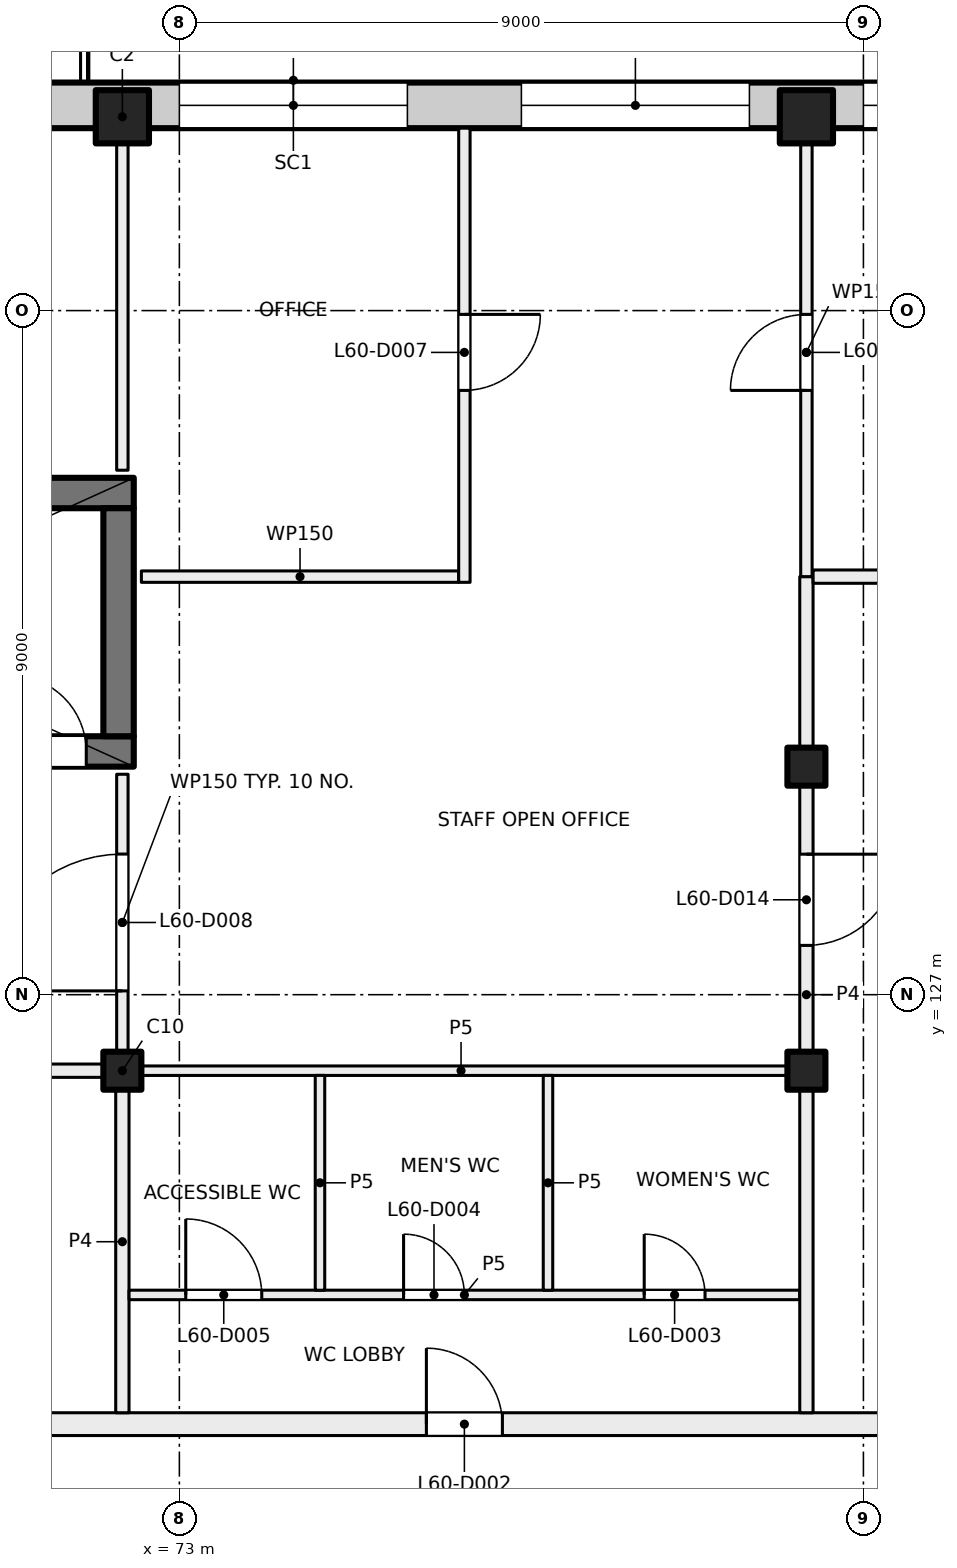
"""IFC4 building model, lengths in metres.
Left out: names, types, materials, properties, quantities, classifications, styles, units other than length and angle.
Written with IfcOpenShell. Run it as: python <this file> out.ifc"""

import sys

from ifc_helpers import new_model, si_unit, direction, frame, frame_2d, origin, origin_2d, place, context, subcontext, project, spatial, rectangle, extrude, element, fill, save


model = new_model("IFC4")
c1 = context("Model", 3, precision=1e-05, world=origin(), true_north=direction((0.0, 1.0)))
c2 = subcontext(c1, "Body", "Model", "MODEL_VIEW")
j1 = project(units=[si_unit("LENGTHUNIT", "METRE"), si_unit("PLANEANGLEUNIT", "RADIAN")], contexts=[c1])
p1 = place(None, origin())
s1 = spatial("IfcSite", under=j1, at=p1, CompositionType="ELEMENT")
p2 = place(p1, origin())
s2 = spatial("IfcBuilding", under=s1, at=p2, CompositionType="ELEMENT")
p3 = place(p2, frame((0.0, 0.0, 253.5)))
s3 = spatial("IfcBuildingStorey", under=s2, at=p3, CompositionType="ELEMENT", Elevation=253.5)
for number, where, z_axis, x_axis in (
    (1, (81.25, 130.0, 0.0), (0.0, 0.0, 1.0), (1.0, 0.0, 0.0)),
    (2, (72.25, 126.0, 0.0), (0.0, 0.0, 1.0), (1.0, 0.0, 0.0)),
    (3, (81.25, 126.0, 0.0), (0.0, 0.0, 1.0), (1.0, 0.0, 0.0)),
):
    element("IfcColumn", number, at=place(p3, frame(where, z_axis=z_axis, x_axis=x_axis)), inside=s3, PredefinedType="COLUMN", context=c2, shape_type="SweptSolid", body=[
        extrude(rectangle(XDim=0.5, YDim=0.5, at=origin_2d()), origin(), (0.0, 0.0, 1.0), 4.0),
    ])
for number, where, z_axis, x_axis in (
    (4, (72.25, 138.55, 0.0), (0.0, 0.0, 1.0), (1.0, 0.0, 0.0)),
    (5, (81.25, 138.55, 0.0), (0.0, 0.0, 1.0), (1.0, 0.0, 0.0)),
):
    element("IfcColumn", number, at=place(p3, frame(where, z_axis=z_axis, x_axis=x_axis)), inside=s3, PredefinedType="COLUMN", context=c2, shape_type="SweptSolid", body=[
        extrude(rectangle(XDim=0.7, YDim=0.7, at=origin_2d()), origin(), (0.0, 0.0, 1.0), 4.0),
    ])
p4 = place(p3, frame((63.5, 130.2, 0.0), z_axis=(0.0, 0.0, 1.0), x_axis=(1.0, 0.0, 0.0)))
e6 = element("IfcWall", 6, at=p4, inside=s3, PredefinedType="SHEAR", context=c2, shape_type="SweptSolid", body=[
    extrude(rectangle(XDim=8.9, YDim=0.4, at=frame_2d((4.45, 0.0))), origin(), (0.0, 0.0, 1.0), 4.0),
])
p5 = place(p4, frame((7.275, 0.0, 0.0)))
e7 = element("IfcOpeningElement", 7, at=p5, cuts=e6, PredefinedType="OPENING", context=c2, shape_type="SweptSolid", body=[
    extrude(rectangle(XDim=1.0, YDim=2.1, at=frame_2d((0.5, 1.05))), frame((0.0, 0.21, 0.0), z_axis=(0.0, -1.0, 0.0), x_axis=(1.0, 0.0, 0.0)), (0.0, 0.0, 1.0), 0.42),
])
p6 = place(p3, frame((64.0, 133.6, 0.0), z_axis=(0.0, 0.0, 1.0), x_axis=(1.0, 0.0, 0.0)))
e8 = element("IfcWall", 8, at=p6, inside=s3, PredefinedType="SHEAR", context=c2, shape_type="SweptSolid", body=[
    extrude(rectangle(XDim=8.4, YDim=0.4, at=frame_2d((4.2, 0.0))), origin(), (0.0, 0.0, 1.0), 4.0),
])
p7 = place(p3, frame((72.2, 130.4, 0.0), z_axis=(0.0, 0.0, 1.0), x_axis=(0.0, 1.0, 0.0)))
e9 = element("IfcWall", 9, at=p7, inside=s3, PredefinedType="SHEAR", context=c2, shape_type="SweptSolid", body=[
    extrude(rectangle(XDim=3.0, YDim=0.4, at=frame_2d((1.5, 0.0))), origin(), (0.0, 0.0, 1.0), 4.0),
])
p8 = place(p3, frame((47.07, 138.7, 0.0), z_axis=(0.0, 0.0, 1.0), x_axis=(1.0, 0.0, 0.0)))
e10 = element("IfcWall", 10, at=p8, inside=s3, PredefinedType="SOLIDWALL", context=c2, shape_type="SweptSolid", body=[
    extrude(rectangle(XDim=43.91, YDim=0.6, at=frame_2d((21.955, 0.0))), origin(), (0.0, 0.0, 1.0), 3.625),
])
p9 = place(p8, frame((3.43, 0.0, 0.9)))
e11 = element("IfcOpeningElement", 11, at=p9, cuts=e10, PredefinedType="OPENING", context=c2, shape_type="SweptSolid", body=[
    extrude(rectangle(XDim=3.0, YDim=2.4, at=frame_2d((1.5, 1.2))), frame((0.0, 0.31, 0.0), z_axis=(0.0, -1.0, 0.0), x_axis=(1.0, 0.0, 0.0)), (0.0, 0.0, 1.0), 0.62),
])
p10 = place(p8, frame((8.53, 0.0, 0.0)))
e12 = element("IfcOpeningElement", 12, at=p10, cuts=e10, PredefinedType="OPENING", context=c2, shape_type="SweptSolid", body=[
    extrude(rectangle(XDim=1.8, YDim=2.4, at=frame_2d((0.9, 1.2))), frame((0.0, 0.31, 0.0), z_axis=(0.0, -1.0, 0.0), x_axis=(1.0, 0.0, 0.0)), (0.0, 0.0, 1.0), 0.62),
])
p11 = place(p8, frame((12.43, 0.0, 0.9)))
e13 = element("IfcOpeningElement", 13, at=p11, cuts=e10, PredefinedType="OPENING", context=c2, shape_type="SweptSolid", body=[
    extrude(rectangle(XDim=3.0, YDim=2.4, at=frame_2d((1.5, 1.2))), frame((0.0, 0.31, 0.0), z_axis=(0.0, -1.0, 0.0), x_axis=(1.0, 0.0, 0.0)), (0.0, 0.0, 1.0), 0.62),
])
p12 = place(p8, frame((16.93, 0.0, 0.9)))
e14 = element("IfcOpeningElement", 14, at=p12, cuts=e10, PredefinedType="OPENING", context=c2, shape_type="SweptSolid", body=[
    extrude(rectangle(XDim=3.0, YDim=2.4, at=frame_2d((1.5, 1.2))), frame((0.0, 0.31, 0.0), z_axis=(0.0, -1.0, 0.0), x_axis=(1.0, 0.0, 0.0)), (0.0, 0.0, 1.0), 0.62),
])
p13 = place(p8, frame((22.03, 0.0, 0.0)))
e15 = element("IfcOpeningElement", 15, at=p13, cuts=e10, PredefinedType="OPENING", context=c2, shape_type="SweptSolid", body=[
    extrude(rectangle(XDim=1.8, YDim=2.4, at=frame_2d((0.9, 1.2))), frame((0.0, 0.31, 0.0), z_axis=(0.0, -1.0, 0.0), x_axis=(1.0, 0.0, 0.0)), (0.0, 0.0, 1.0), 0.62),
])
p14 = place(p8, frame((25.93, 0.0, 0.9)))
e16 = element("IfcOpeningElement", 16, at=p14, cuts=e10, PredefinedType="OPENING", context=c2, shape_type="SweptSolid", body=[
    extrude(rectangle(XDim=3.0, YDim=2.4, at=frame_2d((1.5, 1.2))), frame((0.0, 0.31, 0.0), z_axis=(0.0, -1.0, 0.0), x_axis=(1.0, 0.0, 0.0)), (0.0, 0.0, 1.0), 0.62),
])
p15 = place(p8, frame((30.43, 0.0, 0.9)))
e17 = element("IfcOpeningElement", 17, at=p15, cuts=e10, PredefinedType="OPENING", context=c2, shape_type="SweptSolid", body=[
    extrude(rectangle(XDim=3.0, YDim=2.4, at=frame_2d((1.5, 1.2))), frame((0.0, 0.31, 0.0), z_axis=(0.0, -1.0, 0.0), x_axis=(1.0, 0.0, 0.0)), (0.0, 0.0, 1.0), 0.62),
])
p16 = place(p8, frame((34.93, 0.0, 0.9)))
e18 = element("IfcOpeningElement", 18, at=p16, cuts=e10, PredefinedType="OPENING", context=c2, shape_type="SweptSolid", body=[
    extrude(rectangle(XDim=3.0, YDim=2.4, at=frame_2d((1.5, 1.2))), frame((0.0, 0.31, 0.0), z_axis=(0.0, -1.0, 0.0), x_axis=(1.0, 0.0, 0.0)), (0.0, 0.0, 1.0), 0.62),
])
p17 = place(p8, frame((39.43, 0.0, 0.9)))
e19 = element("IfcOpeningElement", 19, at=p17, cuts=e10, PredefinedType="OPENING", context=c2, shape_type="SweptSolid", body=[
    extrude(rectangle(XDim=3.0, YDim=2.4, at=frame_2d((1.5, 1.2))), frame((0.0, 0.31, 0.0), z_axis=(0.0, -1.0, 0.0), x_axis=(1.0, 0.0, 0.0)), (0.0, 0.0, 1.0), 0.62),
])
p18 = place(p3, frame((54.4, 121.35, 0.0), z_axis=(0.0, 0.0, 1.0), x_axis=(1.0, 0.0, 0.0)))
e20 = element("IfcWall", 20, at=p18, inside=s3, PredefinedType="PARTITIONING", context=c2, shape_type="SweptSolid", body=[
    extrude(rectangle(XDim=31.353, YDim=0.3, at=frame_2d((15.677, 0.0))), origin(), (0.0, 0.0, 1.0), 3.625),
])
p19 = place(p18, frame((21.85, 0.0, 0.0)))
e21 = element("IfcOpeningElement", 21, at=p19, cuts=e20, PredefinedType="OPENING", context=c2, shape_type="SweptSolid", body=[
    extrude(rectangle(XDim=1.0, YDim=2.1, at=frame_2d((0.5, 1.05))), frame((0.0, 0.16, 0.0), z_axis=(0.0, -1.0, 0.0), x_axis=(1.0, 0.0, 0.0)), (0.0, 0.0, 1.0), 0.32),
])
p20 = place(p18, frame((12.75, 0.0, 0.0)))
e22 = element("IfcOpeningElement", 22, at=p20, cuts=e20, PredefinedType="OPENING", context=c2, shape_type="SweptSolid", body=[
    extrude(rectangle(XDim=1.2, YDim=2.1, at=frame_2d((0.6, 1.05))), frame((0.0, 0.16, 0.0), z_axis=(0.0, -1.0, 0.0), x_axis=(1.0, 0.0, 0.0)), (0.0, 0.0, 1.0), 0.32),
])
p21 = place(p18, frame((3.515, 0.0, 0.0)))
e23 = element("IfcOpeningElement", 23, at=p21, cuts=e20, PredefinedType="OPENING", context=c2, shape_type="SweptSolid", body=[
    extrude(rectangle(XDim=1.8, YDim=2.1, at=frame_2d((0.9, 1.05))), frame((0.0, 0.16, 0.0), z_axis=(0.0, -1.0, 0.0), x_axis=(1.0, 0.0, 0.0)), (0.0, 0.0, 1.0), 0.32),
])
p22 = place(p3, frame((72.25, 121.5, 0.0), z_axis=(0.0, 0.0, 1.0), x_axis=(0.0, 1.0, 0.0)))
e24 = element("IfcWall", 24, at=p22, inside=s3, PredefinedType="PARTITIONING", context=c2, shape_type="SweptSolid", body=[
    extrude(rectangle(XDim=4.5, YDim=0.175, at=frame_2d((2.25, 0.0))), origin(), (0.0, 0.0, 1.0), 3.625),
])
p23 = place(p3, frame((72.338, 123.05, 0.0), z_axis=(0.0, 0.0, 1.0), x_axis=(1.0, 0.0, 0.0)))
e25 = element("IfcWall", 25, at=p23, inside=s3, PredefinedType="PARTITIONING", context=c2, shape_type="SweptSolid", body=[
    extrude(rectangle(XDim=8.824, YDim=0.125, at=frame_2d((4.412, 0.0))), origin(), (0.0, 0.0, 1.0), 3.625),
])
p24 = place(p23, frame((6.778, 0.0, 0.0)))
e26 = element("IfcOpeningElement", 26, at=p24, cuts=e25, PredefinedType="OPENING", context=c2, shape_type="SweptSolid", body=[
    extrude(rectangle(XDim=0.8, YDim=2.1, at=frame_2d((0.4, 1.05))), frame((0.0, 0.073, 0.0), z_axis=(0.0, -1.0, 0.0), x_axis=(1.0, 0.0, 0.0)), (0.0, 0.0, 1.0), 0.145),
])
p25 = place(p23, frame((3.612, 0.0, 0.0)))
e27 = element("IfcOpeningElement", 27, at=p25, cuts=e25, PredefinedType="OPENING", context=c2, shape_type="SweptSolid", body=[
    extrude(rectangle(XDim=0.8, YDim=2.1, at=frame_2d((0.4, 1.05))), frame((0.0, 0.073, 0.0), z_axis=(0.0, -1.0, 0.0), x_axis=(1.0, 0.0, 0.0)), (0.0, 0.0, 1.0), 0.145),
])
p26 = place(p23, frame((0.746, 0.0, 0.0)))
e28 = element("IfcOpeningElement", 28, at=p26, cuts=e25, PredefinedType="OPENING", context=c2, shape_type="SweptSolid", body=[
    extrude(rectangle(XDim=1.0, YDim=2.1, at=frame_2d((0.5, 1.05))), frame((0.0, 0.073, 0.0), z_axis=(0.0, -1.0, 0.0), x_axis=(1.0, 0.0, 0.0)), (0.0, 0.0, 1.0), 0.145),
])
p27 = place(p3, frame((72.25, 126.0, 0.0), z_axis=(0.0, 0.0, 1.0), x_axis=(-1.0, 0.0, 0.0)))
e29 = element("IfcWall", 29, at=p27, inside=s3, PredefinedType="PARTITIONING", context=c2, shape_type="SweptSolid", body=[
    extrude(rectangle(XDim=9.088, YDim=0.175, at=frame_2d((4.544, 0.0))), origin(), (0.0, 0.0, 1.0), 3.625),
])
p28 = place(p3, frame((72.25, 126.0, 0.0), z_axis=(0.0, 0.0, 1.0), x_axis=(0.0, 1.0, 0.0)))
e30 = element("IfcWall", 30, at=p28, inside=s3, PredefinedType="PARTITIONING", context=c2, shape_type="SweptSolid", body=[
    extrude(rectangle(XDim=3.9, YDim=0.15, at=frame_2d((1.95, 0.0))), origin(), (0.0, 0.0, 1.0), 3.625),
])
p29 = place(p28, frame((1.05, 0.0, 0.0)))
e31 = element("IfcOpeningElement", 31, at=p29, cuts=e30, PredefinedType="OPENING", context=c2, shape_type="SweptSolid", body=[
    extrude(rectangle(XDim=1.8, YDim=2.1, at=frame_2d((0.9, 1.05))), frame((0.0, 0.085, 0.0), z_axis=(0.0, -1.0, 0.0), x_axis=(1.0, 0.0, 0.0)), (0.0, 0.0, 1.0), 0.17),
])
p30 = place(p3, frame((72.25, 126.0, 0.0), z_axis=(0.0, 0.0, 1.0), x_axis=(1.0, 0.0, 0.0)))
e32 = element("IfcWall", 32, at=p30, inside=s3, PredefinedType="PARTITIONING", context=c2, shape_type="SweptSolid", body=[
    extrude(rectangle(XDim=8.912, YDim=0.125, at=frame_2d((4.456, 0.0))), origin(), (0.0, 0.0, 1.0), 3.625),
])
p31 = place(p3, frame((72.25, 133.9, 0.0), z_axis=(0.0, 0.0, 1.0), x_axis=(0.0, 1.0, 0.0)))
e33 = element("IfcWall", 33, at=p31, inside=s3, PredefinedType="PARTITIONING", context=c2, shape_type="SweptSolid", body=[
    extrude(rectangle(XDim=4.5, YDim=0.15, at=frame_2d((2.25, 0.0))), origin(), (0.0, 0.0, 1.0), 3.625),
])
p32 = place(p3, frame((74.85, 125.938, 0.0), z_axis=(0.0, 0.0, 1.0), x_axis=(0.0, -1.0, 0.0)))
e34 = element("IfcWall", 34, at=p32, inside=s3, PredefinedType="PARTITIONING", context=c2, shape_type="SweptSolid", body=[
    extrude(rectangle(XDim=2.826, YDim=0.125, at=frame_2d((1.413, 0.0))), origin(), (0.0, 0.0, 1.0), 3.625),
])
p33 = place(p3, frame((76.675, 132.5, 0.0), z_axis=(0.0, 0.0, 1.0), x_axis=(-1.0, 0.0, 0.0)))
e35 = element("IfcWall", 35, at=p33, inside=s3, PredefinedType="PARTITIONING", context=c2, shape_type="SweptSolid", body=[
    extrude(rectangle(XDim=4.175, YDim=0.15, at=frame_2d((2.087, 0.0))), origin(), (0.0, 0.0, 1.0), 3.625),
])
p34 = place(p3, frame((76.75, 138.4, 0.0), z_axis=(0.0, 0.0, 1.0), x_axis=(0.0, -1.0, 0.0)))
e36 = element("IfcWall", 36, at=p34, inside=s3, PredefinedType="PARTITIONING", context=c2, shape_type="SweptSolid", body=[
    extrude(rectangle(XDim=5.975, YDim=0.15, at=frame_2d((2.987, 0.0))), origin(), (0.0, 0.0, 1.0), 3.625),
])
p35 = place(p34, frame((2.45, 0.0, 0.0)))
e37 = element("IfcOpeningElement", 37, at=p35, cuts=e36, PredefinedType="OPENING", context=c2, shape_type="SweptSolid", body=[
    extrude(rectangle(XDim=1.0, YDim=2.1, at=frame_2d((0.5, 1.05))), frame((0.0, 0.085, 0.0), z_axis=(0.0, -1.0, 0.0), x_axis=(1.0, 0.0, 0.0)), (0.0, 0.0, 1.0), 0.17),
])
p36 = place(p3, frame((77.85, 125.938, 0.0), z_axis=(0.0, 0.0, 1.0), x_axis=(0.0, -1.0, 0.0)))
e38 = element("IfcWall", 38, at=p36, inside=s3, PredefinedType="PARTITIONING", context=c2, shape_type="SweptSolid", body=[
    extrude(rectangle(XDim=2.826, YDim=0.125, at=frame_2d((1.413, 0.0))), origin(), (0.0, 0.0, 1.0), 3.625),
])
p37 = place(p3, frame((81.25, 132.5, 0.0), z_axis=(0.0, 0.0, 1.0), x_axis=(0.0, -1.0, 0.0)))
e39 = element("IfcWall", 39, at=p37, inside=s3, PredefinedType="PARTITIONING", context=c2, shape_type="SweptSolid", body=[
    extrude(rectangle(XDim=11.0, YDim=0.175, at=frame_2d((5.5, 0.0))), origin(), (0.0, 0.0, 1.0), 3.625),
])
p38 = place(p37, frame((3.652, 0.0, 0.0)))
e40 = element("IfcOpeningElement", 40, at=p38, cuts=e39, PredefinedType="OPENING", context=c2, shape_type="SweptSolid", body=[
    extrude(rectangle(XDim=1.2, YDim=2.1, at=frame_2d((0.6, 1.05))), frame((0.0, 0.097, 0.0), z_axis=(0.0, -1.0, 0.0), x_axis=(1.0, 0.0, 0.0)), (0.0, 0.0, 1.0), 0.195),
])
p39 = place(p3, frame((81.25, 132.5, 0.0), z_axis=(0.0, 0.0, 1.0), x_axis=(0.0, 1.0, 0.0)))
e41 = element("IfcWall", 41, at=p39, inside=s3, PredefinedType="PARTITIONING", context=c2, shape_type="SweptSolid", body=[
    extrude(rectangle(XDim=5.9, YDim=0.15, at=frame_2d((2.95, 0.0))), origin(), (0.0, 0.0, 1.0), 3.625),
])
p40 = place(p39, frame((2.45, 0.0, 0.0)))
e42 = element("IfcOpeningElement", 42, at=p40, cuts=e41, PredefinedType="OPENING", context=c2, shape_type="SweptSolid", body=[
    extrude(rectangle(XDim=1.0, YDim=2.1, at=frame_2d((0.5, 1.05))), frame((0.0, 0.085, 0.0), z_axis=(0.0, -1.0, 0.0), x_axis=(1.0, 0.0, 0.0)), (0.0, 0.0, 1.0), 0.17),
])
p41 = place(p3, frame((85.662, 132.5, 0.0), z_axis=(0.0, 0.0, 1.0), x_axis=(-1.0, 0.0, 0.0)))
e43 = element("IfcWall", 43, at=p41, inside=s3, PredefinedType="PARTITIONING", context=c2, shape_type="SweptSolid", body=[
    extrude(rectangle(XDim=4.324, YDim=0.175, at=frame_2d((2.162, 0.0))), origin(), (0.0, 0.0, 1.0), 3.625),
])
p42 = place(p14, origin())
e44 = element("IfcWindow", 44, at=p42, inside=s3, PartitioningType="SINGLE_PANEL", PredefinedType="WINDOW", context=c2, shape_type="SweptSolid", body=[
    extrude(rectangle(XDim=3.0, YDim=2.4, at=frame_2d((1.5, 1.2))), frame((0.0, 0.03, 0.0), z_axis=(0.0, -1.0, 0.0), x_axis=(1.0, 0.0, 0.0)), (0.0, 0.0, 1.0), 0.06),
])
fill(e16, e44)
p43 = place(p15, origin())
e45 = element("IfcWindow", 45, at=p43, inside=s3, PartitioningType="SINGLE_PANEL", PredefinedType="WINDOW", context=c2, shape_type="SweptSolid", body=[
    extrude(rectangle(XDim=3.0, YDim=2.4, at=frame_2d((1.5, 1.2))), frame((0.0, 0.03, 0.0), z_axis=(0.0, -1.0, 0.0), x_axis=(1.0, 0.0, 0.0)), (0.0, 0.0, 1.0), 0.06),
])
fill(e17, e45)
p44 = place(p16, origin())
e46 = element("IfcWindow", 46, at=p44, inside=s3, PartitioningType="SINGLE_PANEL", PredefinedType="WINDOW", context=c2, shape_type="SweptSolid", body=[
    extrude(rectangle(XDim=3.0, YDim=2.4, at=frame_2d((1.5, 1.2))), frame((0.0, 0.03, 0.0), z_axis=(0.0, -1.0, 0.0), x_axis=(1.0, 0.0, 0.0)), (0.0, 0.0, 1.0), 0.06),
])
fill(e18, e46)
p45 = place(p5, origin())
e47 = element("IfcDoor", 47, at=p45, inside=s3, OperationType="SINGLE_SWING_LEFT", PredefinedType="DOOR", context=c2, shape_type="SweptSolid", body=[
    extrude(rectangle(XDim=1.0, YDim=2.1, at=frame_2d((0.5, 1.05))), frame((0.0, 0.025, 0.0), z_axis=(0.0, -1.0, 0.0), x_axis=(1.0, 0.0, 0.0)), (0.0, 0.0, 1.0), 0.05),
])
fill(e7, e47)
p46 = place(p19, origin())
e48 = element("IfcDoor", 48, at=p46, inside=s3, OperationType="SINGLE_SWING_LEFT", PredefinedType="DOOR", context=c2, shape_type="SweptSolid", body=[
    extrude(rectangle(XDim=1.0, YDim=2.1, at=frame_2d((0.5, 1.05))), frame((0.0, 0.025, 0.0), z_axis=(0.0, -1.0, 0.0), x_axis=(1.0, 0.0, 0.0)), (0.0, 0.0, 1.0), 0.05),
])
fill(e21, e48)
p47 = place(p24, origin())
e49 = element("IfcDoor", 49, at=p47, inside=s3, OperationType="SINGLE_SWING_RIGHT", PredefinedType="DOOR", context=c2, shape_type="SweptSolid", body=[
    extrude(rectangle(XDim=0.8, YDim=2.1, at=frame_2d((0.4, 1.05))), frame((0.0, 0.025, 0.0), z_axis=(0.0, -1.0, 0.0), x_axis=(1.0, 0.0, 0.0)), (0.0, 0.0, 1.0), 0.05),
])
fill(e26, e49)
p48 = place(p25, origin())
e50 = element("IfcDoor", 50, at=p48, inside=s3, OperationType="SINGLE_SWING_LEFT", PredefinedType="DOOR", context=c2, shape_type="SweptSolid", body=[
    extrude(rectangle(XDim=0.8, YDim=2.1, at=frame_2d((0.4, 1.05))), frame((0.0, 0.025, 0.0), z_axis=(0.0, -1.0, 0.0), x_axis=(1.0, 0.0, 0.0)), (0.0, 0.0, 1.0), 0.05),
])
fill(e27, e50)
p49 = place(p26, origin())
e51 = element("IfcDoor", 51, at=p49, inside=s3, OperationType="SINGLE_SWING_LEFT", PredefinedType="DOOR", context=c2, shape_type="SweptSolid", body=[
    extrude(rectangle(XDim=1.0, YDim=2.1, at=frame_2d((0.5, 1.05))), frame((0.0, 0.025, 0.0), z_axis=(0.0, -1.0, 0.0), x_axis=(1.0, 0.0, 0.0)), (0.0, 0.0, 1.0), 0.05),
])
fill(e28, e51)
p50 = place(p40, origin())
e52 = element("IfcDoor", 52, at=p50, inside=s3, OperationType="SINGLE_SWING_LEFT", PredefinedType="DOOR", context=c2, shape_type="SweptSolid", body=[
    extrude(rectangle(XDim=1.0, YDim=2.1, at=frame_2d((0.5, 1.05))), frame((0.0, 0.025, 0.0), z_axis=(0.0, -1.0, 0.0), x_axis=(1.0, 0.0, 0.0)), (0.0, 0.0, 1.0), 0.05),
])
fill(e42, e52)
p51 = place(p35, origin())
e53 = element("IfcDoor", 53, at=p51, inside=s3, OperationType="SINGLE_SWING_LEFT", PredefinedType="DOOR", context=c2, shape_type="SweptSolid", body=[
    extrude(rectangle(XDim=1.0, YDim=2.1, at=frame_2d((0.5, 1.05))), frame((0.0, 0.025, 0.0), z_axis=(0.0, -1.0, 0.0), x_axis=(1.0, 0.0, 0.0)), (0.0, 0.0, 1.0), 0.05),
])
fill(e37, e53)
p52 = place(p29, origin())
e54 = element("IfcDoor", 54, at=p52, inside=s3, OperationType="DOUBLE_DOOR_SINGLE_SWING", PredefinedType="DOOR", context=c2, shape_type="SweptSolid", body=[
    extrude(rectangle(XDim=1.8, YDim=2.1, at=frame_2d((0.9, 1.05))), frame((0.0, 0.025, 0.0), z_axis=(0.0, -1.0, 0.0), x_axis=(1.0, 0.0, 0.0)), (0.0, 0.0, 1.0), 0.05),
])
fill(e31, e54)
p53 = place(p38, origin())
e55 = element("IfcDoor", 55, at=p53, inside=s3, OperationType="DOUBLE_DOOR_SINGLE_SWING", PredefinedType="DOOR", context=c2, shape_type="SweptSolid", body=[
    extrude(rectangle(XDim=1.2, YDim=2.1, at=frame_2d((0.6, 1.05))), frame((0.0, 0.025, 0.0), z_axis=(0.0, -1.0, 0.0), x_axis=(1.0, 0.0, 0.0)), (0.0, 0.0, 1.0), 0.05),
])
fill(e40, e55)
save(model, sys.argv[1])
